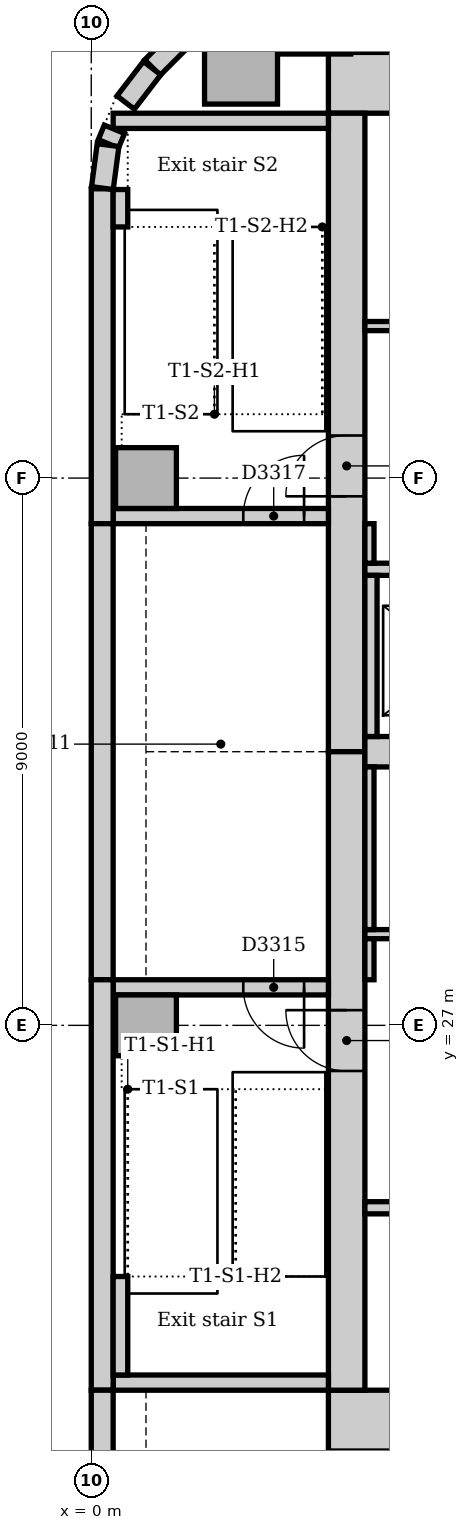
"""IFC4 building model, lengths in metres.
Left out: names, types, materials, properties, quantities, classifications, styles, units other than length and angle.
Written with IfcOpenShell. Run it as: python <this file> out.ifc"""

import sys

from ifc_helpers import new_model, si_unit, direction, frame, frame_2d, origin, origin_2d, place, context, subcontext, project, spatial, rectangle, extrude, element, fill, save


model = new_model("IFC4")
c1 = context("Model", 3, precision=1e-05, world=origin(), true_north=direction((0.0, 1.0)))
c2 = subcontext(c1, "Body", "Model", "MODEL_VIEW")
j1 = project(units=[si_unit("LENGTHUNIT", "METRE"), si_unit("PLANEANGLEUNIT", "RADIAN")], contexts=[c1])
p1 = place(None, origin())
s1 = spatial("IfcSite", under=j1, at=p1, CompositionType="ELEMENT")
p2 = place(p1, origin())
s2 = spatial("IfcBuilding", under=s1, at=p2, CompositionType="ELEMENT")
p3 = place(p2, frame((0.0, 0.0, 38.0)))
s3 = spatial("IfcBuildingStorey", under=s2, at=p3, CompositionType="ELEMENT", Elevation=38.0)
for number, where, z_axis, x_axis in (
    (1, (3.9, 20.5, 0.0), (0.0, 0.0, 1.0), (1.0, 0.0, 0.0)),
    (2, (23.5, 42.5, 0.0), (0.0, 0.0, 1.0), (-1.0, 0.0, 0.0)),
):
    element("IfcWall", number, at=place(p3, frame(where, z_axis=z_axis, x_axis=x_axis)), inside=s3, PredefinedType="SOLIDWALL", context=c2, shape_type="SweptSolid", body=[
        extrude(rectangle(XDim=19.6, YDim=1.0, at=frame_2d((9.8, 0.0))), origin(), (0.0, 0.0, 1.0), 4.0),
    ])
p4 = place(p3, frame((4.2, 42.0, 0.0), z_axis=(0.0, 0.0, 1.0), x_axis=(0.0, -1.0, 0.0)))
e3 = element("IfcWall", 3, at=p4, inside=s3, PredefinedType="SOLIDWALL", context=c2, shape_type="SweptSolid", body=[
    extrude(rectangle(XDim=10.5, YDim=0.6, at=frame_2d((5.25, 0.0))), origin(), (0.0, 0.0, 1.0), 4.0),
])
p5 = place(p4, frame((5.3, 0.0, 0.0)))
e4 = element("IfcOpeningElement", 4, at=p5, cuts=e3, PredefinedType="OPENING", context=c2, shape_type="SweptSolid", body=[
    extrude(rectangle(XDim=1.0, YDim=2.1, at=frame_2d((0.5, 1.05))), frame((0.0, 0.31, 0.0), z_axis=(0.0, -1.0, 0.0), x_axis=(1.0, 0.0, 0.0)), (0.0, 0.0, 1.0), 0.62),
])
p6 = place(p3, frame((4.2, 31.5, 0.0), z_axis=(0.0, 0.0, 1.0), x_axis=(0.0, -1.0, 0.0)))
e5 = element("IfcWall", 5, at=p6, inside=s3, PredefinedType="SOLIDWALL", context=c2, shape_type="SweptSolid", body=[
    extrude(rectangle(XDim=10.5, YDim=0.6, at=frame_2d((5.25, 0.0))), origin(), (0.0, 0.0, 1.0), 4.0),
])
p7 = place(p6, frame((4.25, 0.0, 0.0)))
e6 = element("IfcOpeningElement", 6, at=p7, cuts=e5, PredefinedType="OPENING", context=c2, shape_type="SweptSolid", body=[
    extrude(rectangle(XDim=1.0, YDim=2.1, at=frame_2d((0.5, 1.05))), frame((0.0, 0.31, 0.0), z_axis=(0.0, -1.0, 0.0), x_axis=(1.0, 0.0, 0.0)), (0.0, 0.0, 1.0), 0.62),
])
p8 = place(p3, frame((4.5, 31.5, 0.0), z_axis=(0.0, 0.0, 1.0), x_axis=(1.0, 0.0, 0.0)))
e7 = element("IfcWall", 7, at=p8, inside=s3, PredefinedType="SOLIDWALL", context=c2, shape_type="SweptSolid", body=[
    extrude(rectangle(XDim=18.0, YDim=0.5, at=frame_2d((9.0, 0.0))), origin(), (0.0, 0.0, 1.0), 4.0),
])
p9 = place(p3, frame((0.36, 21.125, 0.0), z_axis=(0.0, 0.0, 1.0), x_axis=(1.0, 0.0, 0.0)))
e8 = element("IfcWall", 8, at=p9, inside=s3, PredefinedType="SOLIDWALL", context=c2, shape_type="SweptSolid", body=[
    extrude(rectangle(XDim=3.54, YDim=0.25, at=frame_2d((1.77, 0.0))), origin(), (0.0, 0.0, 1.0), 4.0),
])
p10 = place(p3, frame((3.9, 27.625, 0.0), z_axis=(0.0, 0.0, 1.0), x_axis=(-1.0, 0.0, 0.0)))
e9 = element("IfcWall", 9, at=p10, inside=s3, PredefinedType="SOLIDWALL", context=c2, shape_type="SweptSolid", body=[
    extrude(rectangle(XDim=3.54, YDim=0.25, at=frame_2d((1.77, 0.0))), origin(), (0.0, 0.0, 1.0), 4.0),
])
p11 = place(p10, frame((0.4, 0.0, 0.0)))
e10 = element("IfcOpeningElement", 10, at=p11, cuts=e9, PredefinedType="OPENING", context=c2, shape_type="SweptSolid", body=[
    extrude(rectangle(XDim=1.0, YDim=2.1, at=frame_2d((0.5, 1.05))), frame((0.0, 0.135, 0.0), z_axis=(0.0, -1.0, 0.0), x_axis=(1.0, 0.0, 0.0)), (0.0, 0.0, 1.0), 0.27),
])
p12 = place(p3, frame((0.36, 35.375, 0.0), z_axis=(0.0, 0.0, 1.0), x_axis=(1.0, 0.0, 0.0)))
e11 = element("IfcWall", 11, at=p12, inside=s3, PredefinedType="SOLIDWALL", context=c2, shape_type="SweptSolid", body=[
    extrude(rectangle(XDim=3.54, YDim=0.25, at=frame_2d((1.77, 0.0))), origin(), (0.0, 0.0, 1.0), 4.0),
])
p13 = place(p12, frame((2.14, 0.0, 0.0)))
e12 = element("IfcOpeningElement", 12, at=p13, cuts=e11, PredefinedType="OPENING", context=c2, shape_type="SweptSolid", body=[
    extrude(rectangle(XDim=1.0, YDim=2.1, at=frame_2d((0.5, 1.05))), frame((0.0, 0.135, 0.0), z_axis=(0.0, -1.0, 0.0), x_axis=(1.0, 0.0, 0.0)), (0.0, 0.0, 1.0), 0.27),
])
p14 = place(p3, frame((3.9, 41.875, 0.0), z_axis=(0.0, 0.0, 1.0), x_axis=(-1.0, 0.0, 0.0)))
e13 = element("IfcWall", 13, at=p14, inside=s3, PredefinedType="SOLIDWALL", context=c2, shape_type="SweptSolid", body=[
    extrude(rectangle(XDim=3.54, YDim=0.25, at=frame_2d((1.77, 0.0))), origin(), (0.0, 0.0, 1.0), 4.0),
])
for number, where, z_axis, x_axis in (
    (14, (3.667, 43.574, 0.0), (0.0, 0.0, 1.0), (1.0, 0.0, 0.0)),
    (15, (2.463, 42.75, 0.0), (0.0, 0.0, 1.0), (1.0, 0.0, 0.0)),
):
    element("IfcColumn", number, at=place(p3, frame(where, z_axis=z_axis, x_axis=x_axis)), inside=s3, PredefinedType="COLUMN", context=c2, shape_type="SweptSolid", body=[
        extrude(rectangle(XDim=1.2, YDim=1.2, at=origin_2d()), origin(), (0.0, 0.0, 1.0), 3.85),
    ])
for number, where, z_axis, x_axis in (
    (16, (0.9, 27.0, 0.0), (0.0, 0.0, 1.0), (1.0, 0.0, 0.0)),
    (17, (0.9, 36.0, 0.0), (0.0, 0.0, 1.0), (1.0, 0.0, 0.0)),
):
    element("IfcColumn", number, at=place(p3, frame(where, z_axis=z_axis, x_axis=x_axis)), inside=s3, PredefinedType="COLUMN", context=c2, shape_type="SweptSolid", body=[
        extrude(rectangle(XDim=1.0, YDim=1.0, at=origin_2d()), origin(), (0.0, 0.0, 1.0), 4.0),
    ])
p15 = place(p3, frame((2.249, 43.994, 0.0), z_axis=(0.0, 0.0, 1.0), x_axis=(-0.707106781187, -0.707106781187, 0.0)))
e18 = element("IfcWall", 18, at=p15, inside=s3, PredefinedType="STANDARD", context=c2, shape_type="SweptSolid", body=[
    extrude(rectangle(XDim=1.757, YDim=0.36, at=frame_2d((0.879, 0.0))), origin(), (0.0, 0.0, 1.0), 3.85),
])
p16 = place(p3, frame((0.18, 40.757, 0.0), z_axis=(0.0, 0.0, 1.0), x_axis=(0.0, -1.0, 0.0)))
e19 = element("IfcWall", 19, at=p16, inside=s3, PredefinedType="STANDARD", context=c2, shape_type="SweptSolid", body=[
    extrude(rectangle(XDim=5.507, YDim=0.36, at=frame_2d((2.754, 0.0))), origin(), (0.0, 0.0, 1.0), 3.85),
])
p17 = place(p3, frame((0.18, 35.25, 0.0), z_axis=(0.0, 0.0, 1.0), x_axis=(0.0, -1.0, 0.0)))
e20 = element("IfcWall", 20, at=p17, inside=s3, PredefinedType="STANDARD", context=c2, shape_type="SweptSolid", body=[
    extrude(rectangle(XDim=7.5, YDim=0.36, at=frame_2d((3.75, 0.0))), origin(), (0.0, 0.0, 1.0), 3.85),
])
p18 = place(p3, frame((0.18, 27.75, 0.0), z_axis=(0.0, 0.0, 1.0), x_axis=(0.0, -1.0, 0.0)))
e21 = element("IfcWall", 21, at=p18, inside=s3, PredefinedType="STANDARD", context=c2, shape_type="SweptSolid", body=[
    extrude(rectangle(XDim=6.75, YDim=0.36, at=frame_2d((3.375, 0.0))), origin(), (0.0, 0.0, 1.0), 3.85),
])
p19 = place(p3, frame((0.18, 21.0, 0.0), z_axis=(0.0, 0.0, 1.0), x_axis=(0.0, -1.0, 0.0)))
e22 = element("IfcWall", 22, at=p19, inside=s3, PredefinedType="STANDARD", context=c2, shape_type="SweptSolid", body=[
    extrude(rectangle(XDim=16.757, YDim=0.36, at=frame_2d((8.379, 0.0))), origin(), (0.0, 0.0, 1.0), 3.85),
])
p20 = place(p19, frame((1.35, 0.0, 0.9)))
e23 = element("IfcOpeningElement", 23, at=p20, cuts=e22, PredefinedType="OPENING", context=c2, shape_type="SweptSolid", body=[
    extrude(rectangle(XDim=3.3, YDim=1.6, at=frame_2d((1.65, 0.8))), frame((0.0, 0.19, 0.0), z_axis=(0.0, -1.0, 0.0), x_axis=(1.0, 0.0, 0.0)), (0.0, 0.0, 1.0), 0.38),
])
p21 = place(p19, frame((5.85, 0.0, 0.9)))
e24 = element("IfcOpeningElement", 24, at=p21, cuts=e22, PredefinedType="OPENING", context=c2, shape_type="SweptSolid", body=[
    extrude(rectangle(XDim=3.3, YDim=1.6, at=frame_2d((1.65, 0.8))), frame((0.0, 0.19, 0.0), z_axis=(0.0, -1.0, 0.0), x_axis=(1.0, 0.0, 0.0)), (0.0, 0.0, 1.0), 0.38),
])
p22 = place(p19, frame((10.35, 0.0, 0.9)))
e25 = element("IfcOpeningElement", 25, at=p22, cuts=e22, PredefinedType="OPENING", context=c2, shape_type="SweptSolid", body=[
    extrude(rectangle(XDim=3.3, YDim=1.6, at=frame_2d((1.65, 0.8))), frame((0.0, 0.19, 0.0), z_axis=(0.0, -1.0, 0.0), x_axis=(1.0, 0.0, 0.0)), (0.0, 0.0, 1.0), 0.38),
])
p23 = place(p3, frame((1.0, 42.741, 0.0), z_axis=(0.0, 0.0, 1.0), x_axis=(-0.608802368033, -0.793321924995, 0.0)))
e26 = element("IfcWall", 26, at=p23, inside=s3, PredefinedType="STANDARD", context=c2, shape_type="SweptSolid", body=[
    extrude(rectangle(XDim=0.713, YDim=0.36, at=frame_2d((0.357, 0.0))), origin(), (0.0, 0.0, 1.0), 3.85),
])
p24 = place(p3, frame((0.381, 41.736, 0.0), z_axis=(0.0, 0.0, 1.0), x_axis=(-0.382773360986, -0.923842277729, 0.0)))
e27 = element("IfcWall", 27, at=p24, inside=s3, PredefinedType="STANDARD", context=c2, shape_type="SweptSolid", body=[
    extrude(rectangle(XDim=0.258, YDim=0.36, at=frame_2d((0.129, 0.0))), origin(), (0.0, 0.0, 1.0), 3.85),
])
p25 = place(p3, frame((0.276, 41.476, 0.0), z_axis=(0.0, 0.0, 1.0), x_axis=(-0.13055608231, -0.99144092581, 0.0)))
e28 = element("IfcWall", 28, at=p25, inside=s3, PredefinedType="STANDARD", context=c2, shape_type="SweptSolid", body=[
    extrude(rectangle(XDim=0.713, YDim=0.36, at=frame_2d((0.356, 0.0))), origin(), (0.0, 0.0, 1.0), 3.85),
])
p26 = place(p3, frame((0.48, 21.25, 0.0), z_axis=(0.0, 0.0, 1.0), x_axis=(0.0, 1.0, 0.0)))
e29 = element("IfcWall", 29, at=p26, inside=s3, PredefinedType="STANDARD", context=c2, shape_type="SweptSolid", body=[
    extrude(rectangle(XDim=1.62, YDim=0.24, at=frame_2d((0.81, 0.0))), origin(), (0.0, 0.0, 1.0), 4.0),
])
p27 = place(p3, frame((0.48, 40.13, 0.0), z_axis=(0.0, 0.0, 1.0), x_axis=(0.0, 1.0, 0.0)))
e30 = element("IfcWall", 30, at=p27, inside=s3, PredefinedType="STANDARD", context=c2, shape_type="SweptSolid", body=[
    extrude(rectangle(XDim=0.615, YDim=0.24, at=frame_2d((0.307, 0.0))), origin(), (0.0, 0.0, 1.0), 4.0),
])
p28 = place(p3, frame((4.5, 24.0, 0.0), z_axis=(0.0, 0.0, 1.0), x_axis=(1.0, 0.0, 0.0)))
e31 = element("IfcWall", 31, at=p28, inside=s3, PredefinedType="PARTITIONING", context=c2, shape_type="SweptSolid", body=[
    extrude(rectangle(XDim=18.0, YDim=0.2, at=frame_2d((9.0, 0.0))), origin(), (0.0, 0.0, 1.0), 3.85),
])
p29 = place(p28, frame((0.95, 0.0, 0.0)))
e32 = element("IfcOpeningElement", 32, at=p29, cuts=e31, PredefinedType="OPENING", context=c2, shape_type="SweptSolid", body=[
    extrude(rectangle(XDim=1.1, YDim=2.1, at=frame_2d((0.55, 1.05))), frame((0.0, 0.11, 0.0), z_axis=(0.0, -1.0, 0.0), x_axis=(1.0, 0.0, 0.0)), (0.0, 0.0, 1.0), 0.22),
])
p30 = place(p28, frame((3.95, 0.0, 0.0)))
e33 = element("IfcOpeningElement", 33, at=p30, cuts=e31, PredefinedType="OPENING", context=c2, shape_type="SweptSolid", body=[
    extrude(rectangle(XDim=1.1, YDim=2.1, at=frame_2d((0.55, 1.05))), frame((0.0, 0.11, 0.0), z_axis=(0.0, -1.0, 0.0), x_axis=(1.0, 0.0, 0.0)), (0.0, 0.0, 1.0), 0.22),
])
p31 = place(p28, frame((6.95, 0.0, 0.0)))
e34 = element("IfcOpeningElement", 34, at=p31, cuts=e31, PredefinedType="OPENING", context=c2, shape_type="SweptSolid", body=[
    extrude(rectangle(XDim=1.1, YDim=2.1, at=frame_2d((0.55, 1.05))), frame((0.0, 0.11, 0.0), z_axis=(0.0, -1.0, 0.0), x_axis=(1.0, 0.0, 0.0)), (0.0, 0.0, 1.0), 0.22),
])
p32 = place(p28, frame((9.95, 0.0, 0.0)))
e35 = element("IfcOpeningElement", 35, at=p32, cuts=e31, PredefinedType="OPENING", context=c2, shape_type="SweptSolid", body=[
    extrude(rectangle(XDim=1.1, YDim=2.1, at=frame_2d((0.55, 1.05))), frame((0.0, 0.11, 0.0), z_axis=(0.0, -1.0, 0.0), x_axis=(1.0, 0.0, 0.0)), (0.0, 0.0, 1.0), 0.22),
])
p33 = place(p28, frame((12.95, 0.0, 0.0)))
e36 = element("IfcOpeningElement", 36, at=p33, cuts=e31, PredefinedType="OPENING", context=c2, shape_type="SweptSolid", body=[
    extrude(rectangle(XDim=1.1, YDim=2.1, at=frame_2d((0.55, 1.05))), frame((0.0, 0.11, 0.0), z_axis=(0.0, -1.0, 0.0), x_axis=(1.0, 0.0, 0.0)), (0.0, 0.0, 1.0), 0.22),
])
p34 = place(p28, frame((15.95, 0.0, 0.0)))
e37 = element("IfcOpeningElement", 37, at=p34, cuts=e31, PredefinedType="OPENING", context=c2, shape_type="SweptSolid", body=[
    extrude(rectangle(XDim=1.1, YDim=2.1, at=frame_2d((0.55, 1.05))), frame((0.0, 0.11, 0.0), z_axis=(0.0, -1.0, 0.0), x_axis=(1.0, 0.0, 0.0)), (0.0, 0.0, 1.0), 0.22),
])
p35 = place(p3, frame((4.5, 34.5, 0.0), z_axis=(0.0, 0.0, 1.0), x_axis=(1.0, 0.0, 0.0)))
e38 = element("IfcWall", 38, at=p35, inside=s3, PredefinedType="PARTITIONING", context=c2, shape_type="SweptSolid", body=[
    extrude(rectangle(XDim=18.0, YDim=0.2, at=frame_2d((9.0, 0.0))), origin(), (0.0, 0.0, 1.0), 3.85),
])
p36 = place(p35, frame((0.95, 0.0, 0.0)))
e39 = element("IfcOpeningElement", 39, at=p36, cuts=e38, PredefinedType="OPENING", context=c2, shape_type="SweptSolid", body=[
    extrude(rectangle(XDim=1.1, YDim=2.1, at=frame_2d((0.55, 1.05))), frame((0.0, 0.11, 0.0), z_axis=(0.0, -1.0, 0.0), x_axis=(1.0, 0.0, 0.0)), (0.0, 0.0, 1.0), 0.22),
])
p37 = place(p35, frame((3.95, 0.0, 0.0)))
e40 = element("IfcOpeningElement", 40, at=p37, cuts=e38, PredefinedType="OPENING", context=c2, shape_type="SweptSolid", body=[
    extrude(rectangle(XDim=1.1, YDim=2.1, at=frame_2d((0.55, 1.05))), frame((0.0, 0.11, 0.0), z_axis=(0.0, -1.0, 0.0), x_axis=(1.0, 0.0, 0.0)), (0.0, 0.0, 1.0), 0.22),
])
p38 = place(p35, frame((12.95, 0.0, 0.0)))
e41 = element("IfcOpeningElement", 41, at=p38, cuts=e38, PredefinedType="OPENING", context=c2, shape_type="SweptSolid", body=[
    extrude(rectangle(XDim=1.1, YDim=2.1, at=frame_2d((0.55, 1.05))), frame((0.0, 0.11, 0.0), z_axis=(0.0, -1.0, 0.0), x_axis=(1.0, 0.0, 0.0)), (0.0, 0.0, 1.0), 0.22),
])
p39 = place(p35, frame((15.95, 0.0, 0.0)))
e42 = element("IfcOpeningElement", 42, at=p39, cuts=e38, PredefinedType="OPENING", context=c2, shape_type="SweptSolid", body=[
    extrude(rectangle(XDim=1.1, YDim=2.1, at=frame_2d((0.55, 1.05))), frame((0.0, 0.11, 0.0), z_axis=(0.0, -1.0, 0.0), x_axis=(1.0, 0.0, 0.0)), (0.0, 0.0, 1.0), 0.22),
])
p40 = place(p3, frame((4.6, 31.75, 0.0), z_axis=(0.0, 0.0, 1.0), x_axis=(0.0, 1.0, 0.0)))
e43 = element("IfcWall", 43, at=p40, inside=s3, PredefinedType="PARTITIONING", context=c2, shape_type="SweptSolid", body=[
    extrude(rectangle(XDim=2.65, YDim=0.2, at=frame_2d((1.325, 0.0))), origin(), (0.0, 0.0, 1.0), 3.85),
])
p41 = place(p3, frame((4.5, 28.5, 0.0), z_axis=(0.0, 0.0, 1.0), x_axis=(1.0, 0.0, 0.0)))
e44 = element("IfcWall", 44, at=p41, inside=s3, PredefinedType="PARTITIONING", context=c2, shape_type="SweptSolid", body=[
    extrude(rectangle(XDim=18.0, YDim=0.15, at=frame_2d((9.0, 0.0))), origin(), (0.0, 0.0, 1.0), 3.85),
])
p42 = place(p41, frame((1.85, 0.0, 0.0)))
e45 = element("IfcOpeningElement", 45, at=p42, cuts=e44, PredefinedType="OPENING", context=c2, shape_type="SweptSolid", body=[
    extrude(rectangle(XDim=0.9, YDim=2.1, at=frame_2d((0.45, 1.05))), frame((0.0, 0.085, 0.0), z_axis=(0.0, -1.0, 0.0), x_axis=(1.0, 0.0, 0.0)), (0.0, 0.0, 1.0), 0.17),
])
p43 = place(p41, frame((6.3, 0.0, 0.0)))
e46 = element("IfcOpeningElement", 46, at=p43, cuts=e44, PredefinedType="OPENING", context=c2, shape_type="SweptSolid", body=[
    extrude(rectangle(XDim=0.9, YDim=2.1, at=frame_2d((0.45, 1.05))), frame((0.0, 0.085, 0.0), z_axis=(0.0, -1.0, 0.0), x_axis=(1.0, 0.0, 0.0)), (0.0, 0.0, 1.0), 0.17),
])
p44 = place(p41, frame((12.95, 0.0, 0.0)))
e47 = element("IfcOpeningElement", 47, at=p44, cuts=e44, PredefinedType="OPENING", context=c2, shape_type="SweptSolid", body=[
    extrude(rectangle(XDim=0.9, YDim=2.1, at=frame_2d((0.45, 1.05))), frame((0.0, 0.085, 0.0), z_axis=(0.0, -1.0, 0.0), x_axis=(1.0, 0.0, 0.0)), (0.0, 0.0, 1.0), 0.17),
])
p45 = place(p3, frame((4.5, 38.5, 0.0), z_axis=(0.0, 0.0, 1.0), x_axis=(1.0, 0.0, 0.0)))
e48 = element("IfcWall", 48, at=p45, inside=s3, PredefinedType="PARTITIONING", context=c2, shape_type="SweptSolid", body=[
    extrude(rectangle(XDim=11.9, YDim=0.15, at=frame_2d((5.95, 0.0))), origin(), (0.0, 0.0, 1.0), 3.85),
])
p46 = place(p45, frame((1.85, 0.0, 0.0)))
e49 = element("IfcOpeningElement", 49, at=p46, cuts=e48, PredefinedType="OPENING", context=c2, shape_type="SweptSolid", body=[
    extrude(rectangle(XDim=0.9, YDim=2.1, at=frame_2d((0.45, 1.05))), frame((0.0, 0.085, 0.0), z_axis=(0.0, -1.0, 0.0), x_axis=(1.0, 0.0, 0.0)), (0.0, 0.0, 1.0), 0.17),
])
p47 = place(p45, frame((4.8, 0.0, 0.0)))
e50 = element("IfcOpeningElement", 50, at=p47, cuts=e48, PredefinedType="OPENING", context=c2, shape_type="SweptSolid", body=[
    extrude(rectangle(XDim=0.9, YDim=2.1, at=frame_2d((0.45, 1.05))), frame((0.0, 0.085, 0.0), z_axis=(0.0, -1.0, 0.0), x_axis=(1.0, 0.0, 0.0)), (0.0, 0.0, 1.0), 0.17),
])
p48 = place(p45, frame((7.05, 0.0, 0.0)))
e51 = element("IfcOpeningElement", 51, at=p48, cuts=e48, PredefinedType="OPENING", context=c2, shape_type="SweptSolid", body=[
    extrude(rectangle(XDim=0.9, YDim=2.1, at=frame_2d((0.45, 1.05))), frame((0.0, 0.085, 0.0), z_axis=(0.0, -1.0, 0.0), x_axis=(1.0, 0.0, 0.0)), (0.0, 0.0, 1.0), 0.17),
])
p49 = place(p45, frame((9.95, 0.0, 0.0)))
e52 = element("IfcOpeningElement", 52, at=p49, cuts=e48, PredefinedType="OPENING", context=c2, shape_type="SweptSolid", body=[
    extrude(rectangle(XDim=0.8, YDim=2.1, at=frame_2d((0.4, 1.05))), frame((0.0, 0.085, 0.0), z_axis=(0.0, -1.0, 0.0), x_axis=(1.0, 0.0, 0.0)), (0.0, 0.0, 1.0), 0.17),
])
p50 = place(p3, frame((4.575, 27.75, 0.0), z_axis=(0.0, 0.0, 1.0), x_axis=(0.0, 1.0, 0.0)))
e53 = element("IfcWall", 53, at=p50, inside=s3, PredefinedType="PARTITIONING", context=c2, shape_type="SweptSolid", body=[
    extrude(rectangle(XDim=0.675, YDim=0.15, at=frame_2d((0.338, 0.0))), origin(), (0.0, 0.0, 1.0), 3.85),
])
p51 = place(p3, frame((4.575, 28.575, 0.0), z_axis=(0.0, 0.0, 1.0), x_axis=(0.0, 1.0, 0.0)))
e54 = element("IfcWall", 54, at=p51, inside=s3, PredefinedType="PARTITIONING", context=c2, shape_type="SweptSolid", body=[
    extrude(rectangle(XDim=2.675, YDim=0.15, at=frame_2d((1.337, 0.0))), origin(), (0.0, 0.0, 1.0), 3.85),
])
p52 = place(p3, frame((4.575, 34.6, 0.0), z_axis=(0.0, 0.0, 1.0), x_axis=(0.0, 1.0, 0.0)))
e55 = element("IfcWall", 55, at=p52, inside=s3, PredefinedType="PARTITIONING", context=c2, shape_type="SweptSolid", body=[
    extrude(rectangle(XDim=0.65, YDim=0.15, at=frame_2d((0.325, 0.0))), origin(), (0.0, 0.0, 1.0), 3.85),
])
p53 = place(p7, frame((1.0, 0.0, 0.0), z_axis=(0.0, 0.0, 1.0), x_axis=(-1.0, 0.0, 0.0)))
e56 = element("IfcDoor", 56, at=p53, inside=s3, OperationType="SINGLE_SWING_RIGHT", PredefinedType="DOOR", context=c2, shape_type="SweptSolid", body=[
    extrude(rectangle(XDim=1.0, YDim=2.1, at=frame_2d((0.5, 1.05))), frame((0.0, 0.025, 0.0), z_axis=(0.0, -1.0, 0.0), x_axis=(1.0, 0.0, 0.0)), (0.0, 0.0, 1.0), 0.05),
])
fill(e6, e56)
p54 = place(p11, origin())
e57 = element("IfcDoor", 57, at=p54, inside=s3, OperationType="SINGLE_SWING_LEFT", PredefinedType="DOOR", context=c2, shape_type="SweptSolid", body=[
    extrude(rectangle(XDim=1.0, YDim=2.1, at=frame_2d((0.5, 1.05))), frame((0.0, 0.025, 0.0), z_axis=(0.0, -1.0, 0.0), x_axis=(1.0, 0.0, 0.0)), (0.0, 0.0, 1.0), 0.05),
])
fill(e10, e57)
p55 = place(p5, frame((1.0, 0.0, 0.0), z_axis=(0.0, 0.0, 1.0), x_axis=(-1.0, 0.0, 0.0)))
e58 = element("IfcDoor", 58, at=p55, inside=s3, OperationType="SINGLE_SWING_LEFT", PredefinedType="DOOR", context=c2, shape_type="SweptSolid", body=[
    extrude(rectangle(XDim=1.0, YDim=2.1, at=frame_2d((0.5, 1.05))), frame((0.0, 0.025, 0.0), z_axis=(0.0, -1.0, 0.0), x_axis=(1.0, 0.0, 0.0)), (0.0, 0.0, 1.0), 0.05),
])
fill(e4, e58)
p56 = place(p13, origin())
e59 = element("IfcDoor", 59, at=p56, inside=s3, OperationType="SINGLE_SWING_RIGHT", PredefinedType="DOOR", context=c2, shape_type="SweptSolid", body=[
    extrude(rectangle(XDim=1.0, YDim=2.1, at=frame_2d((0.5, 1.05))), frame((0.0, 0.025, 0.0), z_axis=(0.0, -1.0, 0.0), x_axis=(1.0, 0.0, 0.0)), (0.0, 0.0, 1.0), 0.05),
])
fill(e12, e59)
save(model, sys.argv[1])
